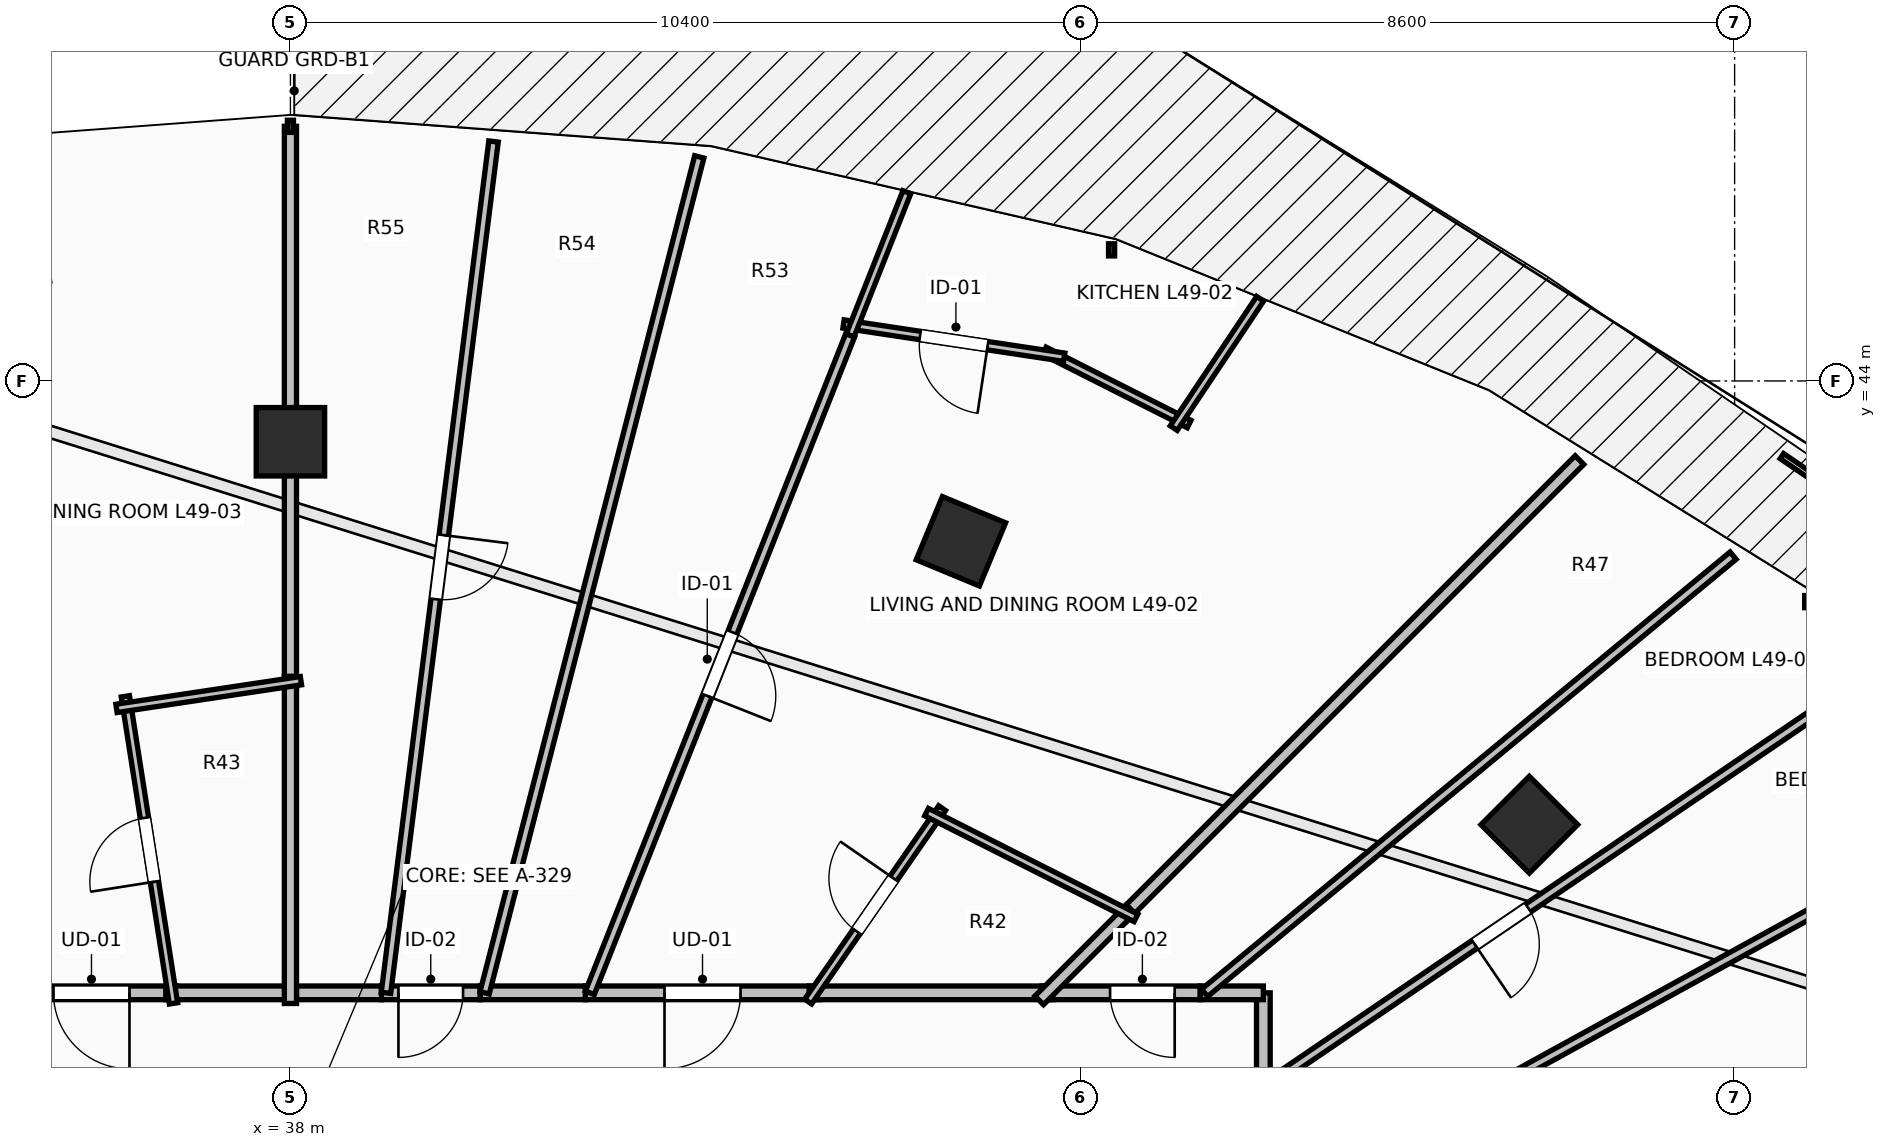
"""IFC4 building model, lengths in metres.
Left out: names, types, materials, properties, quantities, classifications, styles, units other than length and angle.
Written with IfcOpenShell. Run it as: python <this file> out.ifc"""

import sys

from ifc_helpers import new_model, si_unit, direction, frame, frame_2d, origin, origin_2d, place, context, subcontext, project, spatial, rectangle, extrude, element, fill, save


model = new_model("IFC4")
c1 = context("Model", 3, precision=1e-05, world=origin(), true_north=direction((0.0, 1.0)))
c2 = subcontext(c1, "Body", "Model", "MODEL_VIEW")
j1 = project(units=[si_unit("LENGTHUNIT", "METRE"), si_unit("PLANEANGLEUNIT", "RADIAN")], contexts=[c1])
p1 = place(None, origin())
s1 = spatial("IfcSite", under=j1, at=p1, CompositionType="ELEMENT")
p2 = place(p1, origin())
s2 = spatial("IfcBuilding", under=s1, at=p2, CompositionType="ELEMENT")
p3 = place(p2, frame((0.0, 0.0, 182.6)))
s3 = spatial("IfcBuildingStorey", under=s2, at=p3, CompositionType="ELEMENT", Elevation=182.6)
for number, where, z_axis, x_axis in (
    (1, (54.299, 38.162, 0.0), (0.0, 0.0, 1.0), (0.707, 0.707, 0.0)),
    (2, (46.821, 41.891, 0.0), (0.0, 0.0, 1.0), (0.383, 0.924, 0.0)),
    (3, (38.0, 43.2, 0.0), (0.0, 0.0, 1.0), (0.0, 1.0, 0.0)),
):
    element("IfcColumn", number, at=place(p3, frame(where, z_axis=z_axis, x_axis=x_axis)), inside=s3, PredefinedType="COLUMN", context=c2, shape_type="SweptSolid", body=[
        extrude(rectangle(XDim=0.9, YDim=0.9, at=origin_2d()), origin(), (0.0, 0.0, 1.0), 3.5),
    ])
p4 = place(p3, frame((50.8, 34.772, 0.0), z_axis=(0.0, 0.0, 1.0), x_axis=(0.0, 1.0, 0.0)))
e4 = element("IfcWall", 4, at=p4, inside=s3, PredefinedType="PARTITIONING", context=c2, shape_type="SweptSolid", body=[
    extrude(rectangle(XDim=1.178, YDim=0.18, at=frame_2d((0.589, 0.0))), origin(), (0.0, 0.0, 1.0), 2.432),
])
p5 = place(p3, frame((50.8, 35.95, 0.0), z_axis=(0.0, 0.0, 1.0), x_axis=(-1.0, 0.0, 0.0)))
e5 = element("IfcWall", 5, at=p5, inside=s3, PredefinedType="PARTITIONING", context=c2, shape_type="SweptSolid", body=[
    extrude(rectangle(XDim=0.833, YDim=0.18, at=frame_2d((0.417, 0.0))), origin(), (0.0, 0.0, 1.0), 3.24),
])
p6 = place(p3, frame((49.967, 35.95, 0.0), z_axis=(0.0, 0.0, 1.0), x_axis=(-1.0, 0.0, 0.0)))
e6 = element("IfcWall", 6, at=p6, inside=s3, PredefinedType="PARTITIONING", context=c2, shape_type="SweptSolid", body=[
    extrude(rectangle(XDim=2.077, YDim=0.18, at=frame_2d((1.039, 0.0))), origin(), (0.0, 0.0, 1.0), 2.432),
])
p7 = place(p6, frame((0.333, 0.0, 0.0)))
e7 = element("IfcOpeningElement", 7, at=p7, cuts=e6, PredefinedType="OPENING", context=c2, shape_type="SweptSolid", body=[
    extrude(rectangle(XDim=0.85, YDim=2.1, at=frame_2d((0.425, 1.05))), frame((0.0, 0.105, 0.0), z_axis=(0.0, -1.0, 0.0), x_axis=(1.0, 0.0, 0.0)), (0.0, 0.0, 1.0), 0.21),
])
p8 = place(p3, frame((44.964, 35.95, 0.0), z_axis=(0.0, 0.0, 1.0), x_axis=(-1.0, 0.0, 0.0)))
e8 = element("IfcWall", 8, at=p8, inside=s3, PredefinedType="PARTITIONING", context=c2, shape_type="SweptSolid", body=[
    extrude(rectangle(XDim=3.085, YDim=0.18, at=frame_2d((1.542, 0.0))), origin(), (0.0, 0.0, 1.0), 2.922),
])
p9 = place(p8, frame((1.042, 0.0, 0.0)))
e9 = element("IfcOpeningElement", 9, at=p9, cuts=e8, PredefinedType="OPENING", context=c2, shape_type="SweptSolid", body=[
    extrude(rectangle(XDim=1.0, YDim=2.15, at=frame_2d((0.5, 1.075))), frame((0.0, 0.105, 0.0), z_axis=(0.0, -1.0, 0.0), x_axis=(1.0, 0.0, 0.0)), (0.0, 0.0, 1.0), 0.21),
])
p10 = place(p3, frame((48.03, 35.95, 0.0), z_axis=(0.0, 0.0, 1.0), x_axis=(-1.0, 0.0, 0.0)))
e10 = element("IfcWall", 10, at=p10, inside=s3, PredefinedType="PARTITIONING", context=c2, shape_type="SweptSolid", body=[
    extrude(rectangle(XDim=3.206, YDim=0.18, at=frame_2d((1.603, 0.0))), origin(), (0.0, 0.0, 1.0), 2.432),
])
p11 = place(p3, frame((41.879, 35.95, 0.0), z_axis=(0.0, 0.0, 1.0), x_axis=(-1.0, 0.0, 0.0)))
e11 = element("IfcWall", 11, at=p11, inside=s3, PredefinedType="PARTITIONING", context=c2, shape_type="SweptSolid", body=[
    extrude(rectangle(XDim=1.384, YDim=0.18, at=frame_2d((0.692, 0.0))), origin(), (0.0, 0.0, 1.0), 2.922),
])
p12 = place(p3, frame((40.495, 35.95, 0.0), z_axis=(0.0, 0.0, 1.0), x_axis=(-1.0, 0.0, 0.0)))
e12 = element("IfcWall", 12, at=p12, inside=s3, PredefinedType="PARTITIONING", context=c2, shape_type="SweptSolid", body=[
    extrude(rectangle(XDim=1.298, YDim=0.18, at=frame_2d((0.649, 0.0))), origin(), (0.0, 0.0, 1.0), 2.922),
])
p13 = place(p12, frame((0.224, 0.0, 0.0)))
e13 = element("IfcOpeningElement", 13, at=p13, cuts=e12, PredefinedType="OPENING", context=c2, shape_type="SweptSolid", body=[
    extrude(rectangle(XDim=0.85, YDim=2.1, at=frame_2d((0.425, 1.05))), frame((0.0, 0.105, 0.0), z_axis=(0.0, -1.0, 0.0), x_axis=(1.0, 0.0, 0.0)), (0.0, 0.0, 1.0), 0.21),
])
p14 = place(p3, frame((39.197, 35.95, 0.0), z_axis=(0.0, 0.0, 1.0), x_axis=(-1.0, 0.0, 0.0)))
e14 = element("IfcWall", 14, at=p14, inside=s3, PredefinedType="PARTITIONING", context=c2, shape_type="SweptSolid", body=[
    extrude(rectangle(XDim=1.257, YDim=0.18, at=frame_2d((0.628, 0.0))), origin(), (0.0, 0.0, 1.0), 2.922),
])
p15 = place(p3, frame((36.5, 35.95, 0.0), z_axis=(0.0, 0.0, 1.0), x_axis=(-1.0, 0.0, 0.0)))
e15 = element("IfcWall", 15, at=p15, inside=s3, PredefinedType="PARTITIONING", context=c2, shape_type="SweptSolid", body=[
    extrude(rectangle(XDim=2.235, YDim=0.18, at=frame_2d((1.118, 0.0))), origin(), (0.0, 0.0, 1.0), 2.922),
])
p16 = place(p15, frame((0.617, 0.0, 0.0)))
e16 = element("IfcOpeningElement", 16, at=p16, cuts=e15, PredefinedType="OPENING", context=c2, shape_type="SweptSolid", body=[
    extrude(rectangle(XDim=1.0, YDim=2.15, at=frame_2d((0.5, 1.075))), frame((0.0, 0.105, 0.0), z_axis=(0.0, -1.0, 0.0), x_axis=(1.0, 0.0, 0.0)), (0.0, 0.0, 1.0), 0.21),
])
p17 = place(p3, frame((38.08, 35.95, 0.0), z_axis=(0.0, 0.0, 1.0), x_axis=(-1.0, 0.0, 0.0)))
e17 = element("IfcWall", 17, at=p17, inside=s3, PredefinedType="PARTITIONING", context=c2, shape_type="SweptSolid", body=[
    extrude(rectangle(XDim=1.72, YDim=0.18, at=frame_2d((0.86, 0.0))), origin(), (0.0, 0.0, 1.0), 2.922),
])
p18 = place(p3, frame((60.761, 38.513, 0.0), z_axis=(0.0, 0.0, 1.0), x_axis=(-0.876315654865, -0.481737348602, 0.0)))
e18 = element("IfcWall", 18, at=p18, inside=s3, PredefinedType="PARTITIONING", context=c2, shape_type="SweptSolid", body=[
    extrude(rectangle(XDim=11.367, YDim=0.125, at=frame_2d((5.684, 0.0))), origin(), (0.0, 0.0, 1.0), 2.432),
])
p19 = place(p3, frame((58.917, 40.215, 0.0), z_axis=(0.0, 0.0, 1.0), x_axis=(-0.827087951184, -0.562072522906, 0.0)))
e19 = element("IfcWall", 19, at=p19, inside=s3, PredefinedType="PARTITIONING", context=c2, shape_type="SweptSolid", body=[
    extrude(rectangle(XDim=9.814, YDim=0.125, at=frame_2d((4.907, 0.0))), origin(), (0.0, 0.0, 1.0), 2.432),
])
p20 = place(p19, frame((5.602, 0.0, 0.0)))
e20 = element("IfcOpeningElement", 20, at=p20, cuts=e19, PredefinedType="OPENING", context=c2, shape_type="SweptSolid", body=[
    extrude(rectangle(XDim=0.85, YDim=2.1, at=frame_2d((0.425, 1.05))), frame((0.0, 0.077, 0.0), z_axis=(0.0, -1.0, 0.0), x_axis=(1.0, 0.0, 0.0)), (0.0, 0.0, 1.0), 0.155),
])
p21 = place(p3, frame((56.98, 41.702, 0.0), z_axis=(0.0, 0.0, 1.0), x_axis=(-0.770511618294, -0.637425953405, 0.0)))
e21 = element("IfcWall", 21, at=p21, inside=s3, PredefinedType="PARTITIONING", context=c2, shape_type="SweptSolid", body=[
    extrude(rectangle(XDim=9.024, YDim=0.125, at=frame_2d((4.512, 0.0))), origin(), (0.0, 0.0, 1.0), 2.774),
])
p22 = place(p3, frame((54.959, 42.959, 0.0), z_axis=(0.0, 0.0, 1.0), x_axis=(-0.707106781187, -0.707106781187, 0.0)))
e22 = element("IfcWall", 22, at=p22, inside=s3, PredefinedType="PARTITIONING", context=c2, shape_type="SweptSolid", body=[
    extrude(rectangle(XDim=8.492, YDim=0.16, at=frame_2d((4.246, 0.0))), origin(), (0.0, 0.0, 1.0), 2.774),
])
p23 = place(p3, frame((49.053, 37.053, 0.0), z_axis=(0.0, 0.0, 1.0), x_axis=(-0.707106781187, -0.707106781187, 0.0)))
e23 = element("IfcWall", 23, at=p23, inside=s3, PredefinedType="PARTITIONING", context=c2, shape_type="SweptSolid", body=[
    extrude(rectangle(XDim=1.7, YDim=0.16, at=frame_2d((0.85, 0.0))), origin(), (0.0, 0.0, 1.0), 2.432),
])
p24 = place(p3, frame((44.811, 35.835, 0.0), z_axis=(0.0, 0.0, 1.0), x_axis=(0.569300192805, 0.822129728493, 0.0)))
e24 = element("IfcWall", 24, at=p24, inside=s3, PredefinedType="PARTITIONING", context=c2, shape_type="SweptSolid", body=[
    extrude(rectangle(XDim=3.096, YDim=0.11, at=frame_2d((1.548, 0.0))), origin(), (0.0, 0.0, 1.0), 2.922),
])
p25 = place(p24, frame((1.123, 0.0, 0.0)))
e25 = element("IfcOpeningElement", 25, at=p25, cuts=e24, PredefinedType="OPENING", context=c2, shape_type="SweptSolid", body=[
    extrude(rectangle(XDim=0.85, YDim=2.1, at=frame_2d((0.425, 1.05))), frame((0.0, 0.07, 0.0), z_axis=(0.0, -1.0, 0.0), x_axis=(1.0, 0.0, 0.0)), (0.0, 0.0, 1.0), 0.14),
])
p26 = place(p3, frame((46.369, 38.328, 0.0), z_axis=(0.0, 0.0, 1.0), x_axis=(0.892472891666, -0.451101028199, 0.0)))
e26 = element("IfcWall", 26, at=p26, inside=s3, PredefinedType="PARTITIONING", context=c2, shape_type="SweptSolid", body=[
    extrude(rectangle(XDim=3.086, YDim=0.11, at=frame_2d((1.543, 0.0))), origin(), (0.0, 0.0, 1.0), 2.432),
])
p27 = place(p3, frame((49.824, 43.433, 0.0), z_axis=(0.0, 0.0, 1.0), x_axis=(-0.892614331311, 0.450821090388, 0.0)))
e27 = element("IfcWall", 27, at=p27, inside=s3, PredefinedType="PARTITIONING", context=c2, shape_type="SweptSolid", body=[
    extrude(rectangle(XDim=2.136, YDim=0.11, at=frame_2d((1.068, 0.0))), origin(), (0.0, 0.0, 1.0), 3.24),
])
p28 = place(p3, frame((48.18, 44.312, 0.0), z_axis=(0.0, 0.0, 1.0), x_axis=(-0.988815285508, 0.149145335648, 0.0)))
e28 = element("IfcWall", 28, at=p28, inside=s3, PredefinedType="PARTITIONING", context=c2, shape_type="SweptSolid", body=[
    extrude(rectangle(XDim=2.937, YDim=0.11, at=frame_2d((1.468, 0.0))), origin(), (0.0, 0.0, 1.0), 3.24),
])
p29 = place(p28, frame((1.018, 0.0, 0.0)))
e29 = element("IfcOpeningElement", 29, at=p29, cuts=e28, PredefinedType="OPENING", context=c2, shape_type="SweptSolid", body=[
    extrude(rectangle(XDim=0.9, YDim=2.1, at=frame_2d((0.45, 1.05))), frame((0.0, 0.07, 0.0), z_axis=(0.0, -1.0, 0.0), x_axis=(1.0, 0.0, 0.0)), (0.0, 0.0, 1.0), 0.14),
])
p30 = place(p3, frame((45.364, 44.599, 0.0), z_axis=(0.0, 0.0, 1.0), x_axis=(0.368148258243, 0.929767099844, 0.0)))
e30 = element("IfcWall", 30, at=p30, inside=s3, PredefinedType="PARTITIONING", context=c2, shape_type="SweptSolid", body=[
    extrude(rectangle(XDim=2.027, YDim=0.11, at=frame_2d((1.013, 0.0))), origin(), (0.0, 0.0, 1.0), 3.24),
])
p31 = place(p3, frame((50.758, 45.081, 0.0), z_axis=(0.0, 0.0, 1.0), x_axis=(-0.55538833369, -0.831591124773, 0.0)))
e31 = element("IfcWall", 31, at=p31, inside=s3, PredefinedType="PARTITIONING", context=c2, shape_type="SweptSolid", body=[
    extrude(rectangle(XDim=2.046, YDim=0.11, at=frame_2d((1.023, 0.0))), origin(), (0.0, 0.0, 1.0), 3.24),
])
p32 = place(p3, frame((45.363, 44.599, 0.0), z_axis=(0.0, 0.0, 1.0), x_axis=(-0.368121248273, -0.929777794191, 0.0)))
e32 = element("IfcWall", 32, at=p32, inside=s3, PredefinedType="PARTITIONING", context=c2, shape_type="SweptSolid", body=[
    extrude(rectangle(XDim=9.302, YDim=0.125, at=frame_2d((4.651, 0.0))), origin(), (0.0, 0.0, 1.0), 2.774),
])
p33 = place(p32, frame((4.201, 0.0, 0.0)))
e33 = element("IfcOpeningElement", 33, at=p33, cuts=e32, PredefinedType="OPENING", context=c2, shape_type="SweptSolid", body=[
    extrude(rectangle(XDim=0.9, YDim=2.1, at=frame_2d((0.45, 1.05))), frame((0.0, 0.077, 0.0), z_axis=(0.0, -1.0, 0.0), x_axis=(1.0, 0.0, 0.0)), (0.0, 0.0, 1.0), 0.155),
])
p34 = place(p3, frame((43.379, 46.948, 0.0), z_axis=(0.0, 0.0, 1.0), x_axis=(-0.248702786244, -0.968579849116, 0.0)))
e34 = element("IfcWall", 34, at=p34, inside=s3, PredefinedType="PARTITIONING", context=c2, shape_type="SweptSolid", body=[
    extrude(rectangle(XDim=11.355, YDim=0.125, at=frame_2d((5.677, 0.0))), origin(), (0.0, 0.0, 1.0), 2.774),
])
p35 = place(p3, frame((40.672, 47.15, 0.0), z_axis=(0.0, 0.0, 1.0), x_axis=(-0.125346852027, -0.992112980808, 0.0)))
e35 = element("IfcWall", 35, at=p35, inside=s3, PredefinedType="PARTITIONING", context=c2, shape_type="SweptSolid", body=[
    extrude(rectangle(XDim=11.289, YDim=0.125, at=frame_2d((5.645, 0.0))), origin(), (0.0, 0.0, 1.0), 2.774),
])
p36 = place(p35, frame((5.219, 0.0, 0.0)))
e36 = element("IfcOpeningElement", 36, at=p36, cuts=e35, PredefinedType="OPENING", context=c2, shape_type="SweptSolid", body=[
    extrude(rectangle(XDim=0.85, YDim=2.1, at=frame_2d((0.425, 1.05))), frame((0.0, 0.077, 0.0), z_axis=(0.0, -1.0, 0.0), x_axis=(1.0, 0.0, 0.0)), (0.0, 0.0, 1.0), 0.155),
])
p37 = place(p3, frame((38.0, 47.35, 0.0), z_axis=(0.0, 0.0, 1.0), x_axis=(0.0, -1.0, 0.0)))
e37 = element("IfcWall", 37, at=p37, inside=s3, PredefinedType="PARTITIONING", context=c2, shape_type="SweptSolid", body=[
    extrude(rectangle(XDim=7.375, YDim=0.16, at=frame_2d((3.688, 0.0))), origin(), (0.0, 0.0, 1.0), 3.24),
])
p38 = place(p3, frame((38.0, 40.115, 0.0), z_axis=(0.0, 0.0, 1.0), x_axis=(0.0, -1.0, 0.0)))
e38 = element("IfcWall", 38, at=p38, inside=s3, PredefinedType="PARTITIONING", context=c2, shape_type="SweptSolid", body=[
    extrude(rectangle(XDim=4.305, YDim=0.16, at=frame_2d((2.152, 0.0))), origin(), (0.0, 0.0, 1.0), 2.874),
])
p39 = place(p3, frame((36.462, 35.812, 0.0), z_axis=(0.0, 0.0, 1.0), x_axis=(-0.154883213323, 0.987932786292, 0.0)))
e39 = element("IfcWall", 39, at=p39, inside=s3, PredefinedType="PARTITIONING", context=c2, shape_type="SweptSolid", body=[
    extrude(rectangle(XDim=4.089, YDim=0.11, at=frame_2d((2.044, 0.0))), origin(), (0.0, 0.0, 1.0), 2.874),
])
p40 = place(p39, frame((1.619, 0.0, 0.0)))
e40 = element("IfcOpeningElement", 40, at=p40, cuts=e39, PredefinedType="OPENING", context=c2, shape_type="SweptSolid", body=[
    extrude(rectangle(XDim=0.85, YDim=2.1, at=frame_2d((0.425, 1.05))), frame((0.0, 0.07, 0.0), z_axis=(0.0, -1.0, 0.0), x_axis=(1.0, 0.0, 0.0)), (0.0, 0.0, 1.0), 0.14),
])
p41 = place(p3, frame((35.712, 39.692, 0.0), z_axis=(0.0, 0.0, 1.0), x_axis=(0.988892526147, 0.148632337431, 0.0)))
e41 = element("IfcWall", 41, at=p41, inside=s3, PredefinedType="PARTITIONING", context=c2, shape_type="SweptSolid", body=[
    extrude(rectangle(XDim=2.454, YDim=0.11, at=frame_2d((1.227, 0.0))), origin(), (0.0, 0.0, 1.0), 3.24),
])
p42 = place(p9, origin())
e42 = element("IfcDoor", 42, at=p42, inside=s3, OperationType="SINGLE_SWING_RIGHT", PredefinedType="DOOR", context=c2, shape_type="SweptSolid", body=[
    extrude(rectangle(XDim=1.0, YDim=2.15, at=frame_2d((0.5, 1.075))), frame((0.0, 0.025, 0.0), z_axis=(0.0, -1.0, 0.0), x_axis=(1.0, 0.0, 0.0)), (0.0, 0.0, 1.0), 0.05),
])
fill(e9, e42)
p43 = place(p16, origin())
e43 = element("IfcDoor", 43, at=p43, inside=s3, OperationType="SINGLE_SWING_LEFT", PredefinedType="DOOR", context=c2, shape_type="SweptSolid", body=[
    extrude(rectangle(XDim=1.0, YDim=2.15, at=frame_2d((0.5, 1.075))), frame((0.0, 0.025, 0.0), z_axis=(0.0, -1.0, 0.0), x_axis=(1.0, 0.0, 0.0)), (0.0, 0.0, 1.0), 0.05),
])
fill(e16, e43)
p44 = place(p25, origin())
e44 = element("IfcDoor", 44, at=p44, inside=s3, OperationType="SINGLE_SWING_RIGHT", PredefinedType="DOOR", context=c2, shape_type="SweptSolid", body=[
    extrude(rectangle(XDim=0.85, YDim=2.1, at=frame_2d((0.425, 1.05))), frame((0.0, 0.025, 0.0), z_axis=(0.0, -1.0, 0.0), x_axis=(1.0, 0.0, 0.0)), (0.0, 0.0, 1.0), 0.05),
])
fill(e25, e44)
p45 = place(p29, origin())
e45 = element("IfcDoor", 45, at=p45, inside=s3, OperationType="SINGLE_SWING_LEFT", PredefinedType="DOOR", context=c2, shape_type="SweptSolid", body=[
    extrude(rectangle(XDim=0.9, YDim=2.1, at=frame_2d((0.45, 1.05))), frame((0.0, 0.025, 0.0), z_axis=(0.0, -1.0, 0.0), x_axis=(1.0, 0.0, 0.0)), (0.0, 0.0, 1.0), 0.05),
])
fill(e29, e45)
p46 = place(p33, origin())
e46 = element("IfcDoor", 46, at=p46, inside=s3, OperationType="SINGLE_SWING_RIGHT", PredefinedType="DOOR", context=c2, shape_type="SweptSolid", body=[
    extrude(rectangle(XDim=0.9, YDim=2.1, at=frame_2d((0.45, 1.05))), frame((0.0, 0.025, 0.0), z_axis=(0.0, -1.0, 0.0), x_axis=(1.0, 0.0, 0.0)), (0.0, 0.0, 1.0), 0.05),
])
fill(e33, e46)
p47 = place(p40, origin())
e47 = element("IfcDoor", 47, at=p47, inside=s3, OperationType="SINGLE_SWING_LEFT", PredefinedType="DOOR", context=c2, shape_type="SweptSolid", body=[
    extrude(rectangle(XDim=0.85, YDim=2.1, at=frame_2d((0.425, 1.05))), frame((0.0, 0.025, 0.0), z_axis=(0.0, -1.0, 0.0), x_axis=(1.0, 0.0, 0.0)), (0.0, 0.0, 1.0), 0.05),
])
fill(e40, e47)
p48 = place(p7, origin())
e48 = element("IfcDoor", 48, at=p48, inside=s3, OperationType="SINGLE_SWING_LEFT", PredefinedType="DOOR", context=c2, shape_type="SweptSolid", body=[
    extrude(rectangle(XDim=0.85, YDim=2.1, at=frame_2d((0.425, 1.05))), frame((0.0, 0.025, 0.0), z_axis=(0.0, -1.0, 0.0), x_axis=(1.0, 0.0, 0.0)), (0.0, 0.0, 1.0), 0.05),
])
fill(e7, e48)
p49 = place(p13, origin())
e49 = element("IfcDoor", 49, at=p49, inside=s3, OperationType="SINGLE_SWING_RIGHT", PredefinedType="DOOR", context=c2, shape_type="SweptSolid", body=[
    extrude(rectangle(XDim=0.85, YDim=2.1, at=frame_2d((0.425, 1.05))), frame((0.0, 0.025, 0.0), z_axis=(0.0, -1.0, 0.0), x_axis=(1.0, 0.0, 0.0)), (0.0, 0.0, 1.0), 0.05),
])
fill(e13, e49)
p50 = place(p20, origin())
e50 = element("IfcDoor", 50, at=p50, inside=s3, OperationType="SINGLE_SWING_RIGHT", PredefinedType="DOOR", context=c2, shape_type="SweptSolid", body=[
    extrude(rectangle(XDim=0.85, YDim=2.1, at=frame_2d((0.425, 1.05))), frame((0.0, 0.025, 0.0), z_axis=(0.0, -1.0, 0.0), x_axis=(1.0, 0.0, 0.0)), (0.0, 0.0, 1.0), 0.05),
])
fill(e20, e50)
p51 = place(p36, origin())
e51 = element("IfcDoor", 51, at=p51, inside=s3, OperationType="SINGLE_SWING_LEFT", PredefinedType="DOOR", context=c2, shape_type="SweptSolid", body=[
    extrude(rectangle(XDim=0.85, YDim=2.1, at=frame_2d((0.425, 1.05))), frame((0.0, 0.025, 0.0), z_axis=(0.0, -1.0, 0.0), x_axis=(1.0, 0.0, 0.0)), (0.0, 0.0, 1.0), 0.05),
])
fill(e36, e51)
save(model, sys.argv[1])
